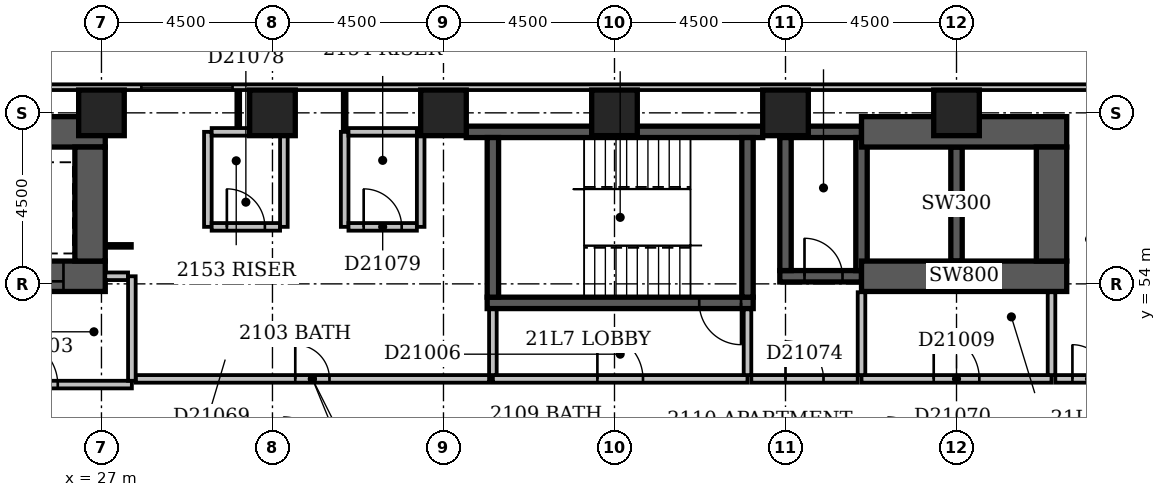
"""IFC4 building model, lengths in metres.
Left out: names, types, materials, properties, quantities, classifications, styles, units other than length and angle.
Written with IfcOpenShell. Run it as: python <this file> out.ifc"""

import sys

from ifc_helpers import new_model, si_unit, direction, frame, frame_2d, origin, origin_2d, place, context, subcontext, project, spatial, rectangle, extrude, element, fill, save


model = new_model("IFC4")
c1 = context("Model", 3, precision=1e-05, world=origin(), true_north=direction((0.0, 1.0)))
c2 = subcontext(c1, "Body", "Model", "MODEL_VIEW")
j1 = project(units=[si_unit("LENGTHUNIT", "METRE"), si_unit("PLANEANGLEUNIT", "RADIAN")], contexts=[c1])
p1 = place(None, origin())
s1 = spatial("IfcSite", under=j1, at=p1, CompositionType="ELEMENT")
p2 = place(p1, origin())
s2 = spatial("IfcBuilding", under=s1, at=p2, CompositionType="ELEMENT")
p3 = place(p2, frame((0.0, 0.0, 86.6)))
s3 = spatial("IfcBuildingStorey", under=s2, at=p3, CompositionType="ELEMENT", Elevation=86.6)
p4 = place(p3, frame((23.8, 54.2, -0.3), z_axis=(0.0, 0.0, 1.0), x_axis=(1.0, 0.0, 0.0)))
e1 = element("IfcWall", 1, at=p4, inside=s3, PredefinedType="SHEAR", context=c2, shape_type="SweptSolid", body=[
    extrude(rectangle(XDim=3.3, YDim=0.8, at=frame_2d((1.65, 0.0))), origin(), (0.0, 0.0, 1.0), 3.6),
])
p5 = place(p4, frame((1.1, 0.0, 0.3)))
e2 = element("IfcOpeningElement", 2, at=p5, cuts=e1, PredefinedType="OPENING", context=c2, shape_type="SweptSolid", body=[
    extrude(rectangle(XDim=1.1, YDim=2.1, at=frame_2d((0.55, 1.05))), frame((0.0, 0.412, 0.0), z_axis=(0.0, -1.0, 0.0), x_axis=(1.0, 0.0, 0.0)), (0.0, 0.0, 1.0), 0.824),
])
p6 = place(p3, frame((23.8, 58.0, -0.3), z_axis=(0.0, 0.0, 1.0), x_axis=(1.0, 0.0, 0.0)))
e3 = element("IfcWall", 3, at=p6, inside=s3, PredefinedType="SHEAR", context=c2, shape_type="SweptSolid", body=[
    extrude(rectangle(XDim=3.3, YDim=0.8, at=frame_2d((1.65, 0.0))), origin(), (0.0, 0.0, 1.0), 3.6),
])
p7 = place(p3, frame((26.7, 54.6, -0.3), z_axis=(0.0, 0.0, 1.0), x_axis=(0.0, 1.0, 0.0)))
e4 = element("IfcWall", 4, at=p7, inside=s3, PredefinedType="SHEAR", context=c2, shape_type="SweptSolid", body=[
    extrude(rectangle(XDim=3.0, YDim=0.8, at=frame_2d((1.5, 0.0))), origin(), (0.0, 0.0, 1.0), 3.6),
])
p8 = place(p3, frame((36.6, 58.0, -0.3), z_axis=(0.0, 0.0, 1.0), x_axis=(1.0, 0.0, 0.0)))
e5 = element("IfcWall", 5, at=p8, inside=s3, PredefinedType="SHEAR", context=c2, shape_type="SweptSolid", body=[
    extrude(rectangle(XDim=7.8, YDim=0.3, at=frame_2d((3.9, 0.0))), origin(), (0.0, 0.0, 1.0), 3.6),
])
p9 = place(p3, frame((37.15, 53.5, -0.3), z_axis=(0.0, 0.0, 1.0), x_axis=(1.0, 0.0, 0.0)))
e6 = element("IfcWall", 6, at=p9, inside=s3, PredefinedType="SHEAR", context=c2, shape_type="SweptSolid", body=[
    extrude(rectangle(XDim=7.0, YDim=0.3, at=frame_2d((3.5, 0.0))), origin(), (0.0, 0.0, 1.0), 3.6),
])
p10 = place(p9, frame((5.58, 0.0, 0.3)))
e7 = element("IfcOpeningElement", 7, at=p10, cuts=e6, PredefinedType="OPENING", context=c2, shape_type="SweptSolid", body=[
    extrude(rectangle(XDim=1.1, YDim=2.1, at=frame_2d((0.55, 1.05))), frame((0.0, 0.162, 0.0), z_axis=(0.0, -1.0, 0.0), x_axis=(1.0, 0.0, 0.0)), (0.0, 0.0, 1.0), 0.324),
])
for number, where, z_axis, x_axis in (
    (8, (37.3, 53.65, -0.3), (0.0, 0.0, 1.0), (0.0, 1.0, 0.0)),
    (9, (44.0, 53.65, -0.3), (0.0, 0.0, 1.0), (0.0, 1.0, 0.0)),
):
    element("IfcWall", number, at=place(p3, frame(where, z_axis=z_axis, x_axis=x_axis)), inside=s3, PredefinedType="SHEAR", context=c2, shape_type="SweptSolid", body=[
        extrude(rectangle(XDim=4.2, YDim=0.3, at=frame_2d((2.1, 0.0))), origin(), (0.0, 0.0, 1.0), 3.6),
    ])
p11 = place(p3, frame((44.85, 54.2, -0.3), z_axis=(0.0, 0.0, 1.0), x_axis=(1.0, 0.0, 0.0)))
e10 = element("IfcWall", 10, at=p11, inside=s3, PredefinedType="SHEAR", context=c2, shape_type="SweptSolid", body=[
    extrude(rectangle(XDim=2.15, YDim=0.3, at=frame_2d((1.075, 0.0))), origin(), (0.0, 0.0, 1.0), 3.6),
])
p12 = place(p11, frame((0.65, 0.0, 0.3)))
e11 = element("IfcOpeningElement", 11, at=p12, cuts=e10, PredefinedType="OPENING", context=c2, shape_type="SweptSolid", body=[
    extrude(rectangle(XDim=1.0, YDim=2.1, at=frame_2d((0.5, 1.05))), frame((0.0, 0.162, 0.0), z_axis=(0.0, -1.0, 0.0), x_axis=(1.0, 0.0, 0.0)), (0.0, 0.0, 1.0), 0.324),
])
p13 = place(p3, frame((44.85, 58.0, -0.3), z_axis=(0.0, 0.0, 1.0), x_axis=(1.0, 0.0, 0.0)))
e12 = element("IfcWall", 12, at=p13, inside=s3, PredefinedType="SHEAR", context=c2, shape_type="SweptSolid", body=[
    extrude(rectangle(XDim=2.15, YDim=0.3, at=frame_2d((1.075, 0.0))), origin(), (0.0, 0.0, 1.0), 3.6),
])
p14 = place(p3, frame((45.0, 54.35, -0.3), z_axis=(0.0, 0.0, 1.0), x_axis=(0.0, 1.0, 0.0)))
e13 = element("IfcWall", 13, at=p14, inside=s3, PredefinedType="SHEAR", context=c2, shape_type="SweptSolid", body=[
    extrude(rectangle(XDim=3.5, YDim=0.3, at=frame_2d((1.75, 0.0))), origin(), (0.0, 0.0, 1.0), 3.6),
])
p15 = place(p3, frame((47.0, 54.2, -0.3), z_axis=(0.0, 0.0, 1.0), x_axis=(1.0, 0.0, 0.0)))
e14 = element("IfcWall", 14, at=p15, inside=s3, PredefinedType="SHEAR", context=c2, shape_type="SweptSolid", body=[
    extrude(rectangle(XDim=5.4, YDim=0.8, at=frame_2d((2.7, 0.0))), origin(), (0.0, 0.0, 1.0), 3.6),
])
p16 = place(p3, frame((47.0, 54.35, -0.3), z_axis=(0.0, 0.0, 1.0), x_axis=(0.0, 1.0, 0.0)))
e15 = element("IfcWall", 15, at=p16, inside=s3, PredefinedType="SHEAR", context=c2, shape_type="SweptSolid", body=[
    extrude(rectangle(XDim=3.5, YDim=0.3, at=frame_2d((1.75, 0.0))), origin(), (0.0, 0.0, 1.0), 3.6),
])
p17 = place(p3, frame((47.0, 58.0, -0.3), z_axis=(0.0, 0.0, 1.0), x_axis=(1.0, 0.0, 0.0)))
e16 = element("IfcWall", 16, at=p17, inside=s3, PredefinedType="SHEAR", context=c2, shape_type="SweptSolid", body=[
    extrude(rectangle(XDim=5.4, YDim=0.8, at=frame_2d((2.7, 0.0))), origin(), (0.0, 0.0, 1.0), 3.6),
])
p18 = place(p3, frame((49.5, 54.6, -0.3), z_axis=(0.0, 0.0, 1.0), x_axis=(0.0, 1.0, 0.0)))
e17 = element("IfcWall", 17, at=p18, inside=s3, PredefinedType="SHEAR", context=c2, shape_type="SweptSolid", body=[
    extrude(rectangle(XDim=3.0, YDim=0.3, at=frame_2d((1.5, 0.0))), origin(), (0.0, 0.0, 1.0), 3.6),
])
p19 = place(p3, frame((52.0, 54.6, -0.3), z_axis=(0.0, 0.0, 1.0), x_axis=(0.0, 1.0, 0.0)))
e18 = element("IfcWall", 18, at=p19, inside=s3, PredefinedType="SHEAR", context=c2, shape_type="SweptSolid", body=[
    extrude(rectangle(XDim=3.0, YDim=0.8, at=frame_2d((1.5, 0.0))), origin(), (0.0, 0.0, 1.0), 3.6),
])
for number, where, z_axis, x_axis in (
    (19, (27.0, 58.5, -0.3), (0.0, 0.0, 1.0), (1.0, 0.0, 0.0)),
    (20, (31.5, 58.5, -0.3), (0.0, 0.0, 1.0), (1.0, 0.0, 0.0)),
    (21, (36.0, 58.5, -0.3), (0.0, 0.0, 1.0), (1.0, 0.0, 0.0)),
    (22, (40.5, 58.5, -0.3), (0.0, 0.0, 1.0), (1.0, 0.0, 0.0)),
    (23, (45.0, 58.5, -0.3), (0.0, 0.0, 1.0), (1.0, 0.0, 0.0)),
    (24, (49.5, 58.5, -0.3), (0.0, 0.0, 1.0), (1.0, 0.0, 0.0)),
):
    element("IfcColumn", number, at=place(p3, frame(where, z_axis=z_axis, x_axis=x_axis)), inside=s3, PredefinedType="COLUMN", context=c2, shape_type="SweptSolid", body=[
        extrude(rectangle(XDim=1.2, YDim=1.2, at=origin_2d()), origin(), (0.0, 0.0, 1.0), 3.6),
    ])
p20 = place(p3, frame((68.1, 59.175, 0.0), z_axis=(0.0, 0.0, 1.0), x_axis=(-1.0, 0.0, 0.0)))
e25 = element("IfcWall", 25, at=p20, inside=s3, PredefinedType="STANDARD", context=c2, shape_type="SweptSolid", body=[
    extrude(rectangle(XDim=68.85, YDim=0.15, at=frame_2d((34.425, 0.0))), origin(), (0.0, 0.0, 1.0), 2.7),
])
p21 = place(p20, frame((37.65, 0.0, 0.6)))
e26 = element("IfcOpeningElement", 26, at=p21, cuts=e25, PredefinedType="OPENING", context=c2, shape_type="SweptSolid", body=[
    extrude(rectangle(XDim=2.4, YDim=1.8, at=frame_2d((1.2, 0.9))), frame((0.0, 0.087, 0.0), z_axis=(0.0, -1.0, 0.0), x_axis=(1.0, 0.0, 0.0)), (0.0, 0.0, 1.0), 0.174),
])
p22 = place(p3, frame((47.0, 51.5, 0.0), z_axis=(0.0, 0.0, 1.0), x_axis=(1.0, 0.0, 0.0)))
e27 = element("IfcWall", 27, at=p22, inside=s3, PredefinedType="PARTITIONING", context=c2, shape_type="SweptSolid", body=[
    extrude(rectangle(XDim=5.0, YDim=0.2, at=frame_2d((2.5, 0.0))), origin(), (0.0, 0.0, 1.0), 3.3),
])
p23 = place(p22, frame((1.9, 0.0, 0.0)))
e28 = element("IfcOpeningElement", 28, at=p23, cuts=e27, PredefinedType="OPENING", context=c2, shape_type="SweptSolid", body=[
    extrude(rectangle(XDim=1.2, YDim=2.1, at=frame_2d((0.6, 1.05))), frame((0.0, 0.112, 0.0), z_axis=(0.0, -1.0, 0.0), x_axis=(1.0, 0.0, 0.0)), (0.0, 0.0, 1.0), 0.224),
])
for number, where, z_axis, x_axis in (
    (29, (52.0, 51.6, 0.0), (0.0, 0.0, 1.0), (0.0, 1.0, 0.0)),
    (30, (47.0, 51.6, 0.0), (0.0, 0.0, 1.0), (0.0, 1.0, 0.0)),
):
    element("IfcWall", number, at=place(p3, frame(where, z_axis=z_axis, x_axis=x_axis)), inside=s3, PredefinedType="PARTITIONING", context=c2, shape_type="SweptSolid", body=[
        extrude(rectangle(XDim=2.18, YDim=0.2, at=frame_2d((1.09, 0.0))), origin(), (0.0, 0.0, 1.0), 3.3),
    ])
p24 = place(p3, frame((23.0, 51.35, 0.0), z_axis=(0.0, 0.0, 1.0), x_axis=(1.0, 0.0, 0.0)))
e31 = element("IfcWall", 31, at=p24, inside=s3, PredefinedType="PARTITIONING", context=c2, shape_type="SweptSolid", body=[
    extrude(rectangle(XDim=4.8, YDim=0.2, at=frame_2d((2.4, 0.0))), origin(), (0.0, 0.0, 1.0), 3.3),
])
p25 = place(p24, frame((1.65, 0.0, 0.0)))
e32 = element("IfcOpeningElement", 32, at=p25, cuts=e31, PredefinedType="OPENING", context=c2, shape_type="SweptSolid", body=[
    extrude(rectangle(XDim=1.2, YDim=2.1, at=frame_2d((0.6, 1.05))), frame((0.0, 0.112, 0.0), z_axis=(0.0, -1.0, 0.0), x_axis=(1.0, 0.0, 0.0)), (0.0, 0.0, 1.0), 0.224),
])
p26 = place(p3, frame((27.8, 51.45, 0.0), z_axis=(0.0, 0.0, 1.0), x_axis=(0.0, 1.0, 0.0)))
e33 = element("IfcWall", 33, at=p26, inside=s3, PredefinedType="PARTITIONING", context=c2, shape_type="SweptSolid", body=[
    extrude(rectangle(XDim=2.75, YDim=0.2, at=frame_2d((1.375, 0.0))), origin(), (0.0, 0.0, 1.0), 3.3),
])
p27 = place(p3, frame((27.1, 54.2, 0.0), z_axis=(0.0, 0.0, 1.0), x_axis=(1.0, 0.0, 0.0)))
e34 = element("IfcWall", 34, at=p27, inside=s3, PredefinedType="PARTITIONING", context=c2, shape_type="SweptSolid", body=[
    extrude(rectangle(XDim=0.6, YDim=0.2, at=frame_2d((0.3, 0.0))), origin(), (0.0, 0.0, 1.0), 3.3),
])
p28 = place(p3, frame((37.3, 51.5, 0.0), z_axis=(0.0, 0.0, 1.0), x_axis=(1.0, 0.0, 0.0)))
e35 = element("IfcWall", 35, at=p28, inside=s3, PredefinedType="PARTITIONING", context=c2, shape_type="SweptSolid", body=[
    extrude(rectangle(XDim=6.7, YDim=0.2, at=frame_2d((3.35, 0.0))), origin(), (0.0, 0.0, 1.0), 3.3),
])
p29 = place(p28, frame((2.75, 0.0, 0.0)))
e36 = element("IfcOpeningElement", 36, at=p29, cuts=e35, PredefinedType="OPENING", context=c2, shape_type="SweptSolid", body=[
    extrude(rectangle(XDim=1.2, YDim=2.1, at=frame_2d((0.6, 1.05))), frame((0.0, 0.112, 0.0), z_axis=(0.0, -1.0, 0.0), x_axis=(1.0, 0.0, 0.0)), (0.0, 0.0, 1.0), 0.224),
])
for number, where, z_axis, x_axis in (
    (37, (44.0, 51.6, 0.0), (0.0, 0.0, 1.0), (0.0, 1.0, 0.0)),
    (38, (37.3, 51.6, 0.0), (0.0, 0.0, 1.0), (0.0, 1.0, 0.0)),
):
    element("IfcWall", number, at=place(p3, frame(where, z_axis=z_axis, x_axis=x_axis)), inside=s3, PredefinedType="PARTITIONING", context=c2, shape_type="SweptSolid", body=[
        extrude(rectangle(XDim=1.73, YDim=0.2, at=frame_2d((0.865, 0.0))), origin(), (0.0, 0.0, 1.0), 3.3),
    ])
p30 = place(p3, frame((27.9, 51.5, 0.0), z_axis=(0.0, 0.0, 1.0), x_axis=(1.0, 0.0, 0.0)))
e39 = element("IfcWall", 39, at=p30, inside=s3, PredefinedType="PARTITIONING", context=c2, shape_type="SweptSolid", body=[
    extrude(rectangle(XDim=9.3, YDim=0.2, at=frame_2d((4.65, 0.0))), origin(), (0.0, 0.0, 1.0), 3.3),
])
p31 = place(p30, frame((4.2, 0.0, 0.0)))
e40 = element("IfcOpeningElement", 40, at=p31, cuts=e39, PredefinedType="OPENING", context=c2, shape_type="SweptSolid", body=[
    extrude(rectangle(XDim=0.9, YDim=2.1, at=frame_2d((0.45, 1.05))), frame((0.0, 0.112, 0.0), z_axis=(0.0, -1.0, 0.0), x_axis=(1.0, 0.0, 0.0)), (0.0, 0.0, 1.0), 0.224),
])
p32 = place(p3, frame((44.1, 51.5, 0.0), z_axis=(0.0, 0.0, 1.0), x_axis=(1.0, 0.0, 0.0)))
e41 = element("IfcWall", 41, at=p32, inside=s3, PredefinedType="PARTITIONING", context=c2, shape_type="SweptSolid", body=[
    extrude(rectangle(XDim=2.8, YDim=0.2, at=frame_2d((1.4, 0.0))), origin(), (0.0, 0.0, 1.0), 3.3),
])
p33 = place(p32, frame((0.9, 0.0, 0.0)))
e42 = element("IfcOpeningElement", 42, at=p33, cuts=e41, PredefinedType="OPENING", context=c2, shape_type="SweptSolid", body=[
    extrude(rectangle(XDim=1.0, YDim=2.1, at=frame_2d((0.5, 1.05))), frame((0.0, 0.112, 0.0), z_axis=(0.0, -1.0, 0.0), x_axis=(1.0, 0.0, 0.0)), (0.0, 0.0, 1.0), 0.224),
])
p34 = place(p3, frame((52.1, 51.5, 0.0), z_axis=(0.0, 0.0, 1.0), x_axis=(1.0, 0.0, 0.0)))
e43 = element("IfcWall", 43, at=p34, inside=s3, PredefinedType="PARTITIONING", context=c2, shape_type="SweptSolid", body=[
    extrude(rectangle(XDim=1.8, YDim=0.2, at=frame_2d((0.9, 0.0))), origin(), (0.0, 0.0, 1.0), 3.3),
])
p35 = place(p34, frame((0.45, 0.0, 0.0)))
e44 = element("IfcOpeningElement", 44, at=p35, cuts=e43, PredefinedType="OPENING", context=c2, shape_type="SweptSolid", body=[
    extrude(rectangle(XDim=0.9, YDim=2.1, at=frame_2d((0.45, 1.05))), frame((0.0, 0.112, 0.0), z_axis=(0.0, -1.0, 0.0), x_axis=(1.0, 0.0, 0.0)), (0.0, 0.0, 1.0), 0.224),
])
p36 = place(p3, frame((27.1, 55.0, 0.0), z_axis=(0.0, 0.0, 1.0), x_axis=(1.0, 0.0, 0.0)))
e45 = element("IfcWall", 45, at=p36, inside=s3, PredefinedType="PARTITIONING", context=c2, shape_type="SweptSolid", body=[
    extrude(rectangle(XDim=0.7, YDim=0.1, at=frame_2d((0.35, 0.0))), origin(), (0.0, 0.0, 1.0), 3.3),
])
p37 = place(p3, frame((29.8, 55.5, 0.0), z_axis=(0.0, 0.0, 1.0), x_axis=(0.0, 1.0, 0.0)))
e46 = element("IfcWall", 46, at=p37, inside=s3, PredefinedType="PARTITIONING", context=c2, shape_type="SweptSolid", body=[
    extrude(rectangle(XDim=2.5, YDim=0.2, at=frame_2d((1.25, 0.0))), origin(), (0.0, 0.0, 1.0), 3.3),
])
p38 = place(p3, frame((29.9, 55.5, 0.0), z_axis=(0.0, 0.0, 1.0), x_axis=(1.0, 0.0, 0.0)))
e47 = element("IfcWall", 47, at=p38, inside=s3, PredefinedType="PARTITIONING", context=c2, shape_type="SweptSolid", body=[
    extrude(rectangle(XDim=1.8, YDim=0.2, at=frame_2d((0.9, 0.0))), origin(), (0.0, 0.0, 1.0), 3.3),
])
p39 = place(p38, frame((0.4, 0.0, 0.0)))
e48 = element("IfcOpeningElement", 48, at=p39, cuts=e47, PredefinedType="OPENING", context=c2, shape_type="SweptSolid", body=[
    extrude(rectangle(XDim=1.0, YDim=2.1, at=frame_2d((0.5, 1.05))), frame((0.0, 0.112, 0.0), z_axis=(0.0, -1.0, 0.0), x_axis=(1.0, 0.0, 0.0)), (0.0, 0.0, 1.0), 0.224),
])
for number, where, z_axis, x_axis in (
    (49, (31.8, 55.5, 0.0), (0.0, 0.0, 1.0), (0.0, 1.0, 0.0)),
    (50, (33.4, 55.5, 0.0), (0.0, 0.0, 1.0), (0.0, 1.0, 0.0)),
):
    element("IfcWall", number, at=place(p3, frame(where, z_axis=z_axis, x_axis=x_axis)), inside=s3, PredefinedType="PARTITIONING", context=c2, shape_type="SweptSolid", body=[
        extrude(rectangle(XDim=2.5, YDim=0.2, at=frame_2d((1.25, 0.0))), origin(), (0.0, 0.0, 1.0), 3.3),
    ])
p40 = place(p3, frame((33.5, 55.5, 0.0), z_axis=(0.0, 0.0, 1.0), x_axis=(1.0, 0.0, 0.0)))
e51 = element("IfcWall", 51, at=p40, inside=s3, PredefinedType="PARTITIONING", context=c2, shape_type="SweptSolid", body=[
    extrude(rectangle(XDim=1.8, YDim=0.2, at=frame_2d((0.9, 0.0))), origin(), (0.0, 0.0, 1.0), 3.3),
])
p41 = place(p40, frame((0.4, 0.0, 0.0)))
e52 = element("IfcOpeningElement", 52, at=p41, cuts=e51, PredefinedType="OPENING", context=c2, shape_type="SweptSolid", body=[
    extrude(rectangle(XDim=1.0, YDim=2.1, at=frame_2d((0.5, 1.05))), frame((0.0, 0.112, 0.0), z_axis=(0.0, -1.0, 0.0), x_axis=(1.0, 0.0, 0.0)), (0.0, 0.0, 1.0), 0.224),
])
p42 = place(p3, frame((35.4, 55.5, 0.0), z_axis=(0.0, 0.0, 1.0), x_axis=(0.0, 1.0, 0.0)))
e53 = element("IfcWall", 53, at=p42, inside=s3, PredefinedType="PARTITIONING", context=c2, shape_type="SweptSolid", body=[
    extrude(rectangle(XDim=2.5, YDim=0.2, at=frame_2d((1.25, 0.0))), origin(), (0.0, 0.0, 1.0), 2.4),
])
p43 = place(p3, frame((29.9, 58.0, 0.0), z_axis=(0.0, 0.0, 1.0), x_axis=(1.0, 0.0, 0.0)))
e54 = element("IfcWall", 54, at=p43, inside=s3, PredefinedType="PARTITIONING", context=c2, shape_type="SweptSolid", body=[
    extrude(rectangle(XDim=1.8, YDim=0.2, at=frame_2d((0.9, 0.0))), origin(), (0.0, 0.0, 1.0), 3.3),
])
p44 = place(p3, frame((33.4, 58.0, 0.0), z_axis=(0.0, 0.0, 1.0), x_axis=(0.0, 1.0, 0.0)))
e55 = element("IfcWall", 55, at=p44, inside=s3, PredefinedType="PARTITIONING", context=c2, shape_type="SweptSolid", body=[
    extrude(rectangle(XDim=1.1, YDim=0.1, at=frame_2d((0.55, 0.0))), origin(), (0.0, 0.0, 1.0), 3.3),
])
p45 = place(p3, frame((33.5, 58.0, 0.0), z_axis=(0.0, 0.0, 1.0), x_axis=(1.0, 0.0, 0.0)))
e56 = element("IfcWall", 56, at=p45, inside=s3, PredefinedType="PARTITIONING", context=c2, shape_type="SweptSolid", body=[
    extrude(rectangle(XDim=1.8, YDim=0.2, at=frame_2d((0.9, 0.0))), origin(), (0.0, 0.0, 1.0), 3.3),
])
p46 = place(p3, frame((30.6, 58.1, 0.0), z_axis=(0.0, 0.0, 1.0), x_axis=(0.0, 1.0, 0.0)))
e57 = element("IfcWall", 57, at=p46, inside=s3, PredefinedType="PARTITIONING", context=c2, shape_type="SweptSolid", body=[
    extrude(rectangle(XDim=1.0, YDim=0.1, at=frame_2d((0.5, 0.0))), origin(), (0.0, 0.0, 1.0), 3.3),
])
p47 = place(p21, origin())
e58 = element("IfcWindow", 58, at=p47, inside=s3, PartitioningType="SINGLE_PANEL", PredefinedType="WINDOW", context=c2, shape_type="SweptSolid", body=[
    extrude(rectangle(XDim=2.4, YDim=1.8, at=frame_2d((1.2, 0.9))), frame((0.0, 0.03, 0.0), z_axis=(0.0, -1.0, 0.0), x_axis=(1.0, 0.0, 0.0)), (0.0, 0.0, 1.0), 0.06),
])
fill(e26, e58)
p48 = place(p25, origin())
e59 = element("IfcDoor", 59, at=p48, inside=s3, OperationType="SINGLE_SWING_LEFT", PredefinedType="DOOR", context=c2, shape_type="SweptSolid", body=[
    extrude(rectangle(XDim=1.2, YDim=2.1, at=frame_2d((0.6, 1.05))), frame((0.0, 0.025, 0.0), z_axis=(0.0, -1.0, 0.0), x_axis=(1.0, 0.0, 0.0)), (0.0, 0.0, 1.0), 0.05),
])
fill(e32, e59)
p49 = place(p5, origin())
e60 = element("IfcDoor", 60, at=p49, inside=s3, OperationType="SLIDING_TO_LEFT", PredefinedType="DOOR", context=c2, shape_type="SweptSolid", body=[
    extrude(rectangle(XDim=1.1, YDim=2.1, at=frame_2d((0.55, 1.05))), frame((0.0, 0.025, 0.0), z_axis=(0.0, -1.0, 0.0), x_axis=(1.0, 0.0, 0.0)), (0.0, 0.0, 1.0), 0.05),
])
fill(e2, e60)
p50 = place(p29, origin())
e61 = element("IfcDoor", 61, at=p50, inside=s3, OperationType="SINGLE_SWING_LEFT", PredefinedType="DOOR", context=c2, shape_type="SweptSolid", body=[
    extrude(rectangle(XDim=1.2, YDim=2.1, at=frame_2d((0.6, 1.05))), frame((0.0, 0.025, 0.0), z_axis=(0.0, -1.0, 0.0), x_axis=(1.0, 0.0, 0.0)), (0.0, 0.0, 1.0), 0.05),
])
fill(e36, e61)
p51 = place(p23, origin())
e62 = element("IfcDoor", 62, at=p51, inside=s3, OperationType="SINGLE_SWING_LEFT", PredefinedType="DOOR", context=c2, shape_type="SweptSolid", body=[
    extrude(rectangle(XDim=1.2, YDim=2.1, at=frame_2d((0.6, 1.05))), frame((0.0, 0.025, 0.0), z_axis=(0.0, -1.0, 0.0), x_axis=(1.0, 0.0, 0.0)), (0.0, 0.0, 1.0), 0.05),
])
fill(e28, e62)
p52 = place(p12, origin())
e63 = element("IfcDoor", 63, at=p52, inside=s3, OperationType="SINGLE_SWING_LEFT", PredefinedType="DOOR", context=c2, shape_type="SweptSolid", body=[
    extrude(rectangle(XDim=1.0, YDim=2.1, at=frame_2d((0.5, 1.05))), frame((0.0, 0.025, 0.0), z_axis=(0.0, -1.0, 0.0), x_axis=(1.0, 0.0, 0.0)), (0.0, 0.0, 1.0), 0.05),
])
fill(e11, e63)
p53 = place(p10, origin())
e64 = element("IfcDoor", 64, at=p53, inside=s3, OperationType="SINGLE_SWING_RIGHT", PredefinedType="DOOR", context=c2, shape_type="SweptSolid", body=[
    extrude(rectangle(XDim=1.1, YDim=2.1, at=frame_2d((0.55, 1.05))), frame((0.0, 0.025, 0.0), z_axis=(0.0, -1.0, 0.0), x_axis=(1.0, 0.0, 0.0)), (0.0, 0.0, 1.0), 0.05),
])
fill(e7, e64)
p54 = place(p31, origin())
e65 = element("IfcDoor", 65, at=p54, inside=s3, OperationType="SINGLE_SWING_LEFT", PredefinedType="DOOR", context=c2, shape_type="SweptSolid", body=[
    extrude(rectangle(XDim=0.9, YDim=2.1, at=frame_2d((0.45, 1.05))), frame((0.0, 0.025, 0.0), z_axis=(0.0, -1.0, 0.0), x_axis=(1.0, 0.0, 0.0)), (0.0, 0.0, 1.0), 0.05),
])
fill(e40, e65)
p55 = place(p33, origin())
e66 = element("IfcDoor", 66, at=p55, inside=s3, OperationType="SINGLE_SWING_LEFT", PredefinedType="DOOR", context=c2, shape_type="SweptSolid", body=[
    extrude(rectangle(XDim=1.0, YDim=2.1, at=frame_2d((0.5, 1.05))), frame((0.0, 0.025, 0.0), z_axis=(0.0, -1.0, 0.0), x_axis=(1.0, 0.0, 0.0)), (0.0, 0.0, 1.0), 0.05),
])
fill(e42, e66)
p56 = place(p35, origin())
e67 = element("IfcDoor", 67, at=p56, inside=s3, OperationType="SINGLE_SWING_LEFT", PredefinedType="DOOR", context=c2, shape_type="SweptSolid", body=[
    extrude(rectangle(XDim=0.9, YDim=2.1, at=frame_2d((0.45, 1.05))), frame((0.0, 0.025, 0.0), z_axis=(0.0, -1.0, 0.0), x_axis=(1.0, 0.0, 0.0)), (0.0, 0.0, 1.0), 0.05),
])
fill(e44, e67)
p57 = place(p39, origin())
e68 = element("IfcDoor", 68, at=p57, inside=s3, OperationType="SINGLE_SWING_LEFT", PredefinedType="DOOR", context=c2, shape_type="SweptSolid", body=[
    extrude(rectangle(XDim=1.0, YDim=2.1, at=frame_2d((0.5, 1.05))), frame((0.0, 0.025, 0.0), z_axis=(0.0, -1.0, 0.0), x_axis=(1.0, 0.0, 0.0)), (0.0, 0.0, 1.0), 0.05),
])
fill(e48, e68)
p58 = place(p41, origin())
e69 = element("IfcDoor", 69, at=p58, inside=s3, OperationType="SINGLE_SWING_LEFT", PredefinedType="DOOR", context=c2, shape_type="SweptSolid", body=[
    extrude(rectangle(XDim=1.0, YDim=2.1, at=frame_2d((0.5, 1.05))), frame((0.0, 0.025, 0.0), z_axis=(0.0, -1.0, 0.0), x_axis=(1.0, 0.0, 0.0)), (0.0, 0.0, 1.0), 0.05),
])
fill(e52, e69)
save(model, sys.argv[1])
